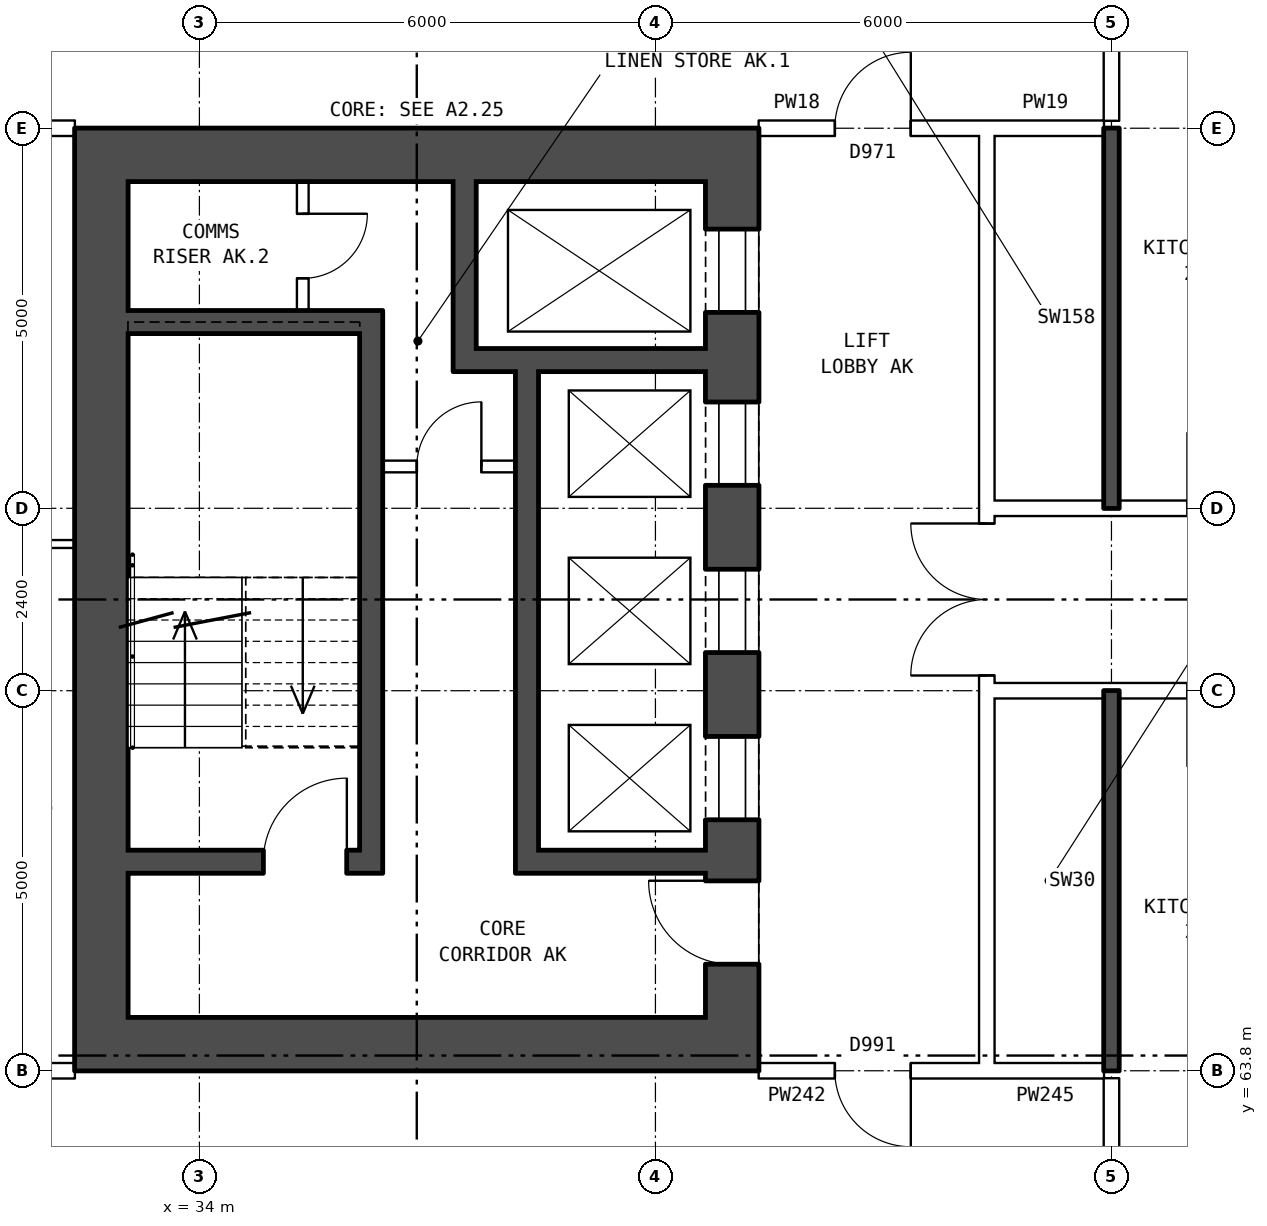
"""IFC4 building model, lengths in metres.
Left out: names, types, materials, properties, quantities, classifications, styles, units other than length and angle.
Written with IfcOpenShell. Run it as: python <this file> out.ifc"""

import sys

from ifc_helpers import new_model, si_unit, direction, frame, frame_2d, origin, place, context, subcontext, project, spatial, rectangle, extrude, element, fill, save


model = new_model("IFC4")
c1 = context("Model", 3, precision=1e-05, world=origin(), true_north=direction((0.0, 1.0)))
c2 = subcontext(c1, "Body", "Model", "MODEL_VIEW")
j1 = project(units=[si_unit("LENGTHUNIT", "METRE"), si_unit("PLANEANGLEUNIT", "RADIAN")], contexts=[c1])
p1 = place(None, origin())
s1 = spatial("IfcSite", under=j1, at=p1, CompositionType="ELEMENT")
p2 = place(p1, origin())
s2 = spatial("IfcBuilding", under=s1, at=p2, CompositionType="ELEMENT")
p3 = place(p2, frame((0.0, 0.0, 87.1)))
s3 = spatial("IfcBuildingStorey", under=s2, at=p3, CompositionType="ELEMENT", Elevation=87.1)
p4 = place(p3, frame((41.01, 75.5, 0.0), z_axis=(0.0, 0.0, 1.0), x_axis=(0.0, -1.0, 0.0)))
e1 = element("IfcWall", 1, at=p4, inside=s3, PredefinedType="SHEAR", context=c2, shape_type="SweptSolid", body=[
    extrude(rectangle(XDim=11.0, YDim=0.7, at=frame_2d((5.5, 0.0))), origin(), (0.0, 0.0, 1.0), 2.85),
])
p5 = place(p4, frame((0.625, 0.0, 0.0)))
e2 = element("IfcOpeningElement", 2, at=p5, cuts=e1, PredefinedType="OPENING", context=c2, shape_type="SweptSolid", body=[
    extrude(rectangle(XDim=1.1, YDim=2.1, at=frame_2d((0.55, 1.05))), frame((0.0, 0.36, 0.0), z_axis=(0.0, -1.0, 0.0), x_axis=(1.0, 0.0, 0.0)), (0.0, 0.0, 1.0), 0.72),
])
p6 = place(p4, frame((2.9, 0.0, 0.0)))
e3 = element("IfcOpeningElement", 3, at=p6, cuts=e1, PredefinedType="OPENING", context=c2, shape_type="SweptSolid", body=[
    extrude(rectangle(XDim=1.1, YDim=2.1, at=frame_2d((0.55, 1.05))), frame((0.0, 0.36, 0.0), z_axis=(0.0, -1.0, 0.0), x_axis=(1.0, 0.0, 0.0)), (0.0, 0.0, 1.0), 0.72),
])
p7 = place(p4, frame((5.1, 0.0, 0.0)))
e4 = element("IfcOpeningElement", 4, at=p7, cuts=e1, PredefinedType="OPENING", context=c2, shape_type="SweptSolid", body=[
    extrude(rectangle(XDim=1.1, YDim=2.1, at=frame_2d((0.55, 1.05))), frame((0.0, 0.36, 0.0), z_axis=(0.0, -1.0, 0.0), x_axis=(1.0, 0.0, 0.0)), (0.0, 0.0, 1.0), 0.72),
])
p8 = place(p4, frame((7.3, 0.0, 0.0)))
e5 = element("IfcOpeningElement", 5, at=p8, cuts=e1, PredefinedType="OPENING", context=c2, shape_type="SweptSolid", body=[
    extrude(rectangle(XDim=1.1, YDim=2.1, at=frame_2d((0.55, 1.05))), frame((0.0, 0.36, 0.0), z_axis=(0.0, -1.0, 0.0), x_axis=(1.0, 0.0, 0.0)), (0.0, 0.0, 1.0), 0.72),
])
p9 = place(p4, frame((9.2, 0.0, 0.0)))
e6 = element("IfcOpeningElement", 6, at=p9, cuts=e1, PredefinedType="OPENING", context=c2, shape_type="SweptSolid", body=[
    extrude(rectangle(XDim=1.1, YDim=2.1, at=frame_2d((0.55, 1.05))), frame((0.0, 0.36, 0.0), z_axis=(0.0, -1.0, 0.0), x_axis=(1.0, 0.0, 0.0)), (0.0, 0.0, 1.0), 0.72),
])
p10 = place(p3, frame((32.71, 75.5, 0.0), z_axis=(0.0, 0.0, 1.0), x_axis=(0.0, -1.0, 0.0)))
e7 = element("IfcWall", 7, at=p10, inside=s3, PredefinedType="SHEAR", context=c2, shape_type="SweptSolid", body=[
    extrude(rectangle(XDim=11.0, YDim=0.7, at=frame_2d((5.5, 0.0))), origin(), (0.0, 0.0, 1.0), 2.85),
])
for number, where, z_axis, x_axis in (
    (8, (41.36, 75.85, 0.0), (0.0, 0.0, 1.0), (-1.0, 0.0, 0.0)),
    (9, (41.36, 64.15, 0.0), (0.0, 0.0, 1.0), (-1.0, 0.0, 0.0)),
):
    element("IfcWall", number, at=place(p3, frame(where, z_axis=z_axis, x_axis=x_axis)), inside=s3, PredefinedType="SHEAR", context=c2, shape_type="SweptSolid", body=[
        extrude(rectangle(XDim=9.0, YDim=0.7, at=frame_2d((4.5, 0.0))), origin(), (0.0, 0.0, 1.0), 2.85),
    ])
p11 = place(p3, frame((36.11, 73.65, 0.0), z_axis=(0.0, 0.0, 1.0), x_axis=(-1.0, 0.0, 0.0)))
e10 = element("IfcWall", 10, at=p11, inside=s3, PredefinedType="SHEAR", context=c2, shape_type="SweptSolid", body=[
    extrude(rectangle(XDim=3.05, YDim=0.3, at=frame_2d((1.525, 0.0))), origin(), (0.0, 0.0, 1.0), 2.85),
])
p12 = place(p3, frame((40.66, 73.15, 0.0), z_axis=(0.0, 0.0, 1.0), x_axis=(-1.0, 0.0, 0.0)))
e11 = element("IfcWall", 11, at=p12, inside=s3, PredefinedType="SHEAR", context=c2, shape_type="SweptSolid", body=[
    extrude(rectangle(XDim=3.32, YDim=0.3, at=frame_2d((1.66, 0.0))), origin(), (0.0, 0.0, 1.0), 2.85),
])
p13 = place(p3, frame((38.16, 71.75, 0.0), z_axis=(0.0, 0.0, 1.0), x_axis=(-1.0, 0.0, 0.0)))
e12 = element("IfcWall", 12, at=p13, inside=s3, PredefinedType="PARTITIONING", context=c2, shape_type="SweptSolid", body=[
    extrude(rectangle(XDim=1.75, YDim=0.15, at=frame_2d((0.875, 0.0))), origin(), (0.0, 0.0, 1.0), 2.85),
])
p14 = place(p13, frame((0.45, 0.0, 0.0)))
e13 = element("IfcOpeningElement", 13, at=p14, cuts=e12, PredefinedType="OPENING", context=c2, shape_type="SweptSolid", body=[
    extrude(rectangle(XDim=0.85, YDim=2.1, at=frame_2d((0.425, 1.05))), frame((0.0, 0.085, 0.0), z_axis=(0.0, -1.0, 0.0), x_axis=(1.0, 0.0, 0.0)), (0.0, 0.0, 1.0), 0.17),
])
p15 = place(p3, frame((40.66, 66.55, 0.0), z_axis=(0.0, 0.0, 1.0), x_axis=(-1.0, 0.0, 0.0)))
e14 = element("IfcWall", 14, at=p15, inside=s3, PredefinedType="SHEAR", context=c2, shape_type="SweptSolid", body=[
    extrude(rectangle(XDim=2.2, YDim=0.3, at=frame_2d((1.1, 0.0))), origin(), (0.0, 0.0, 1.0), 2.85),
])
p16 = place(p3, frame((36.11, 66.55, 0.0), z_axis=(0.0, 0.0, 1.0), x_axis=(-1.0, 0.0, 0.0)))
e15 = element("IfcWall", 15, at=p16, inside=s3, PredefinedType="SHEAR", context=c2, shape_type="SweptSolid", body=[
    extrude(rectangle(XDim=3.05, YDim=0.3, at=frame_2d((1.525, 0.0))), origin(), (0.0, 0.0, 1.0), 2.85),
])
p17 = place(p16, frame((0.17, 0.0, 0.0)))
e16 = element("IfcOpeningElement", 16, at=p17, cuts=e15, PredefinedType="OPENING", context=c2, shape_type="SweptSolid", body=[
    extrude(rectangle(XDim=1.1, YDim=2.1, at=frame_2d((0.55, 1.05))), frame((0.0, 0.16, 0.0), z_axis=(0.0, -1.0, 0.0), x_axis=(1.0, 0.0, 0.0)), (0.0, 0.0, 1.0), 0.32),
])
p18 = place(p3, frame((38.31, 73.0, 0.0), z_axis=(0.0, 0.0, 1.0), x_axis=(0.0, -1.0, 0.0)))
e17 = element("IfcWall", 17, at=p18, inside=s3, PredefinedType="SHEAR", context=c2, shape_type="SweptSolid", body=[
    extrude(rectangle(XDim=6.6, YDim=0.3, at=frame_2d((3.3, 0.0))), origin(), (0.0, 0.0, 1.0), 2.85),
])
p19 = place(p3, frame((37.49, 75.5, 0.0), z_axis=(0.0, 0.0, 1.0), x_axis=(0.0, -1.0, 0.0)))
e18 = element("IfcWall", 18, at=p19, inside=s3, PredefinedType="SHEAR", context=c2, shape_type="SweptSolid", body=[
    extrude(rectangle(XDim=2.2, YDim=0.3, at=frame_2d((1.1, 0.0))), origin(), (0.0, 0.0, 1.0), 2.85),
])
p20 = place(p3, frame((36.26, 73.8, 0.0), z_axis=(0.0, 0.0, 1.0), x_axis=(0.0, -1.0, 0.0)))
e19 = element("IfcWall", 19, at=p20, inside=s3, PredefinedType="SHEAR", context=c2, shape_type="SweptSolid", body=[
    extrude(rectangle(XDim=7.4, YDim=0.3, at=frame_2d((3.7, 0.0))), origin(), (0.0, 0.0, 1.0), 2.85),
])
p21 = place(p3, frame((35.36, 75.5, 0.0), z_axis=(0.0, 0.0, 1.0), x_axis=(0.0, -1.0, 0.0)))
e20 = element("IfcWall", 20, at=p21, inside=s3, PredefinedType="PARTITIONING", context=c2, shape_type="SweptSolid", body=[
    extrude(rectangle(XDim=1.7, YDim=0.15, at=frame_2d((0.85, 0.0))), origin(), (0.0, 0.0, 1.0), 2.85),
])
p22 = place(p21, frame((0.425, 0.0, 0.0)))
e21 = element("IfcOpeningElement", 21, at=p22, cuts=e20, PredefinedType="OPENING", context=c2, shape_type="SweptSolid", body=[
    extrude(rectangle(XDim=0.85, YDim=2.1, at=frame_2d((0.425, 1.05))), frame((0.0, 0.085, 0.0), z_axis=(0.0, -1.0, 0.0), x_axis=(1.0, 0.0, 0.0)), (0.0, 0.0, 1.0), 0.17),
])
p23 = place(p3, frame((44.36, 63.9, 0.0), z_axis=(0.0, 0.0, 1.0), x_axis=(0.0, 1.0, 0.0)))
e22 = element("IfcWall", 22, at=p23, inside=s3, PredefinedType="PARTITIONING", context=c2, shape_type="SweptSolid", body=[
    extrude(rectangle(XDim=12.2, YDim=0.2, at=frame_2d((6.1, 0.0))), origin(), (0.0, 0.0, 1.0), 2.85),
])
p24 = place(p23, frame((5.1, 0.0, 0.0)))
e23 = element("IfcOpeningElement", 23, at=p24, cuts=e22, PredefinedType="OPENING", context=c2, shape_type="SweptSolid", body=[
    extrude(rectangle(XDim=2.0, YDim=2.1, at=frame_2d((1.0, 1.05))), frame((0.0, 0.11, 0.0), z_axis=(0.0, -1.0, 0.0), x_axis=(1.0, 0.0, 0.0)), (0.0, 0.0, 1.0), 0.22),
])
p25 = place(p3, frame((26.01, 63.8, 0.0), z_axis=(0.0, 0.0, 1.0), x_axis=(1.0, 0.0, 0.0)))
e24 = element("IfcWall", 24, at=p25, inside=s3, PredefinedType="PARTITIONING", context=c2, shape_type="SweptSolid", body=[
    extrude(rectangle(XDim=6.35, YDim=0.2, at=frame_2d((3.175, 0.0))), origin(), (0.0, 0.0, 1.0), 2.85),
])
p26 = place(p25, frame((3.77, 0.0, 0.0)))
e25 = element("IfcOpeningElement", 25, at=p26, cuts=e24, PredefinedType="OPENING", context=c2, shape_type="SweptSolid", body=[
    extrude(rectangle(XDim=0.8, YDim=2.1, at=frame_2d((0.4, 1.05))), frame((0.0, 0.11, 0.0), z_axis=(0.0, -1.0, 0.0), x_axis=(1.0, 0.0, 0.0)), (0.0, 0.0, 1.0), 0.22),
])
p27 = place(p3, frame((41.36, 63.8, 0.0), z_axis=(0.0, 0.0, 1.0), x_axis=(1.0, 0.0, 0.0)))
e26 = element("IfcWall", 26, at=p27, inside=s3, PredefinedType="PARTITIONING", context=c2, shape_type="SweptSolid", body=[
    extrude(rectangle(XDim=3.0, YDim=0.2, at=frame_2d((1.5, 0.0))), origin(), (0.0, 0.0, 1.0), 2.85),
])
p28 = place(p27, frame((1.0, 0.0, 0.0)))
e27 = element("IfcOpeningElement", 27, at=p28, cuts=e26, PredefinedType="OPENING", context=c2, shape_type="SweptSolid", body=[
    extrude(rectangle(XDim=1.0, YDim=2.1, at=frame_2d((0.5, 1.05))), frame((0.0, 0.11, 0.0), z_axis=(0.0, -1.0, 0.0), x_axis=(1.0, 0.0, 0.0)), (0.0, 0.0, 1.0), 0.22),
])
p29 = place(p3, frame((44.36, 63.8, 0.0), z_axis=(0.0, 0.0, 1.0), x_axis=(1.0, 0.0, 0.0)))
e28 = element("IfcWall", 28, at=p29, inside=s3, PredefinedType="PARTITIONING", context=c2, shape_type="SweptSolid", body=[
    extrude(rectangle(XDim=1.54, YDim=0.2, at=frame_2d((0.77, 0.0))), origin(), (0.0, 0.0, 1.0), 2.85),
])
p30 = place(p3, frame((44.36, 68.8, 0.0), z_axis=(0.0, 0.0, 1.0), x_axis=(1.0, 0.0, 0.0)))
e29 = element("IfcWall", 29, at=p30, inside=s3, PredefinedType="PARTITIONING", context=c2, shape_type="SweptSolid", body=[
    extrude(rectangle(XDim=19.28, YDim=0.2, at=frame_2d((9.64, 0.0))), origin(), (0.0, 0.0, 1.0), 2.85),
])
p31 = place(p30, frame((14.64, 0.0, 0.0)))
e30 = element("IfcOpeningElement", 30, at=p31, cuts=e29, PredefinedType="OPENING", context=c2, shape_type="SweptSolid", body=[
    extrude(rectangle(XDim=1.0, YDim=2.1, at=frame_2d((0.5, 1.05))), frame((0.0, 0.11, 0.0), z_axis=(0.0, -1.0, 0.0), x_axis=(1.0, 0.0, 0.0)), (0.0, 0.0, 1.0), 0.22),
])
p32 = place(p30, frame((11.64, 0.0, 0.0)))
e31 = element("IfcOpeningElement", 31, at=p32, cuts=e29, PredefinedType="OPENING", context=c2, shape_type="SweptSolid", body=[
    extrude(rectangle(XDim=1.0, YDim=2.1, at=frame_2d((0.5, 1.05))), frame((0.0, 0.11, 0.0), z_axis=(0.0, -1.0, 0.0), x_axis=(1.0, 0.0, 0.0)), (0.0, 0.0, 1.0), 0.22),
])
p33 = place(p30, frame((2.64, 0.0, 0.0)))
e32 = element("IfcOpeningElement", 32, at=p33, cuts=e29, PredefinedType="OPENING", context=c2, shape_type="SweptSolid", body=[
    extrude(rectangle(XDim=1.0, YDim=2.1, at=frame_2d((0.5, 1.05))), frame((0.0, 0.11, 0.0), z_axis=(0.0, -1.0, 0.0), x_axis=(1.0, 0.0, 0.0)), (0.0, 0.0, 1.0), 0.22),
])
p34 = place(p3, frame((28.1, 70.73, 0.0), z_axis=(0.0, 0.0, 1.0), x_axis=(1.0, 0.0, 0.0)))
e33 = element("IfcWall", 33, at=p34, inside=s3, PredefinedType="PARTITIONING", context=c2, shape_type="SweptSolid", body=[
    extrude(rectangle(XDim=4.26, YDim=0.1, at=frame_2d((2.13, 0.0))), origin(), (0.0, 0.0, 1.0), 2.85),
])
p35 = place(p3, frame((44.36, 71.2, 0.0), z_axis=(0.0, 0.0, 1.0), x_axis=(1.0, 0.0, 0.0)))
e34 = element("IfcWall", 34, at=p35, inside=s3, PredefinedType="PARTITIONING", context=c2, shape_type="SweptSolid", body=[
    extrude(rectangle(XDim=19.28, YDim=0.2, at=frame_2d((9.64, 0.0))), origin(), (0.0, 0.0, 1.0), 2.85),
])
p36 = place(p35, frame((14.64, 0.0, 0.0)))
e35 = element("IfcOpeningElement", 35, at=p36, cuts=e34, PredefinedType="OPENING", context=c2, shape_type="SweptSolid", body=[
    extrude(rectangle(XDim=1.0, YDim=2.1, at=frame_2d((0.5, 1.05))), frame((0.0, 0.11, 0.0), z_axis=(0.0, -1.0, 0.0), x_axis=(1.0, 0.0, 0.0)), (0.0, 0.0, 1.0), 0.22),
])
p37 = place(p35, frame((8.64, 0.0, 0.0)))
e36 = element("IfcOpeningElement", 36, at=p37, cuts=e34, PredefinedType="OPENING", context=c2, shape_type="SweptSolid", body=[
    extrude(rectangle(XDim=1.0, YDim=2.1, at=frame_2d((0.5, 1.05))), frame((0.0, 0.11, 0.0), z_axis=(0.0, -1.0, 0.0), x_axis=(1.0, 0.0, 0.0)), (0.0, 0.0, 1.0), 0.22),
])
p38 = place(p35, frame((2.64, 0.0, 0.0)))
e37 = element("IfcOpeningElement", 37, at=p38, cuts=e34, PredefinedType="OPENING", context=c2, shape_type="SweptSolid", body=[
    extrude(rectangle(XDim=1.0, YDim=2.1, at=frame_2d((0.5, 1.05))), frame((0.0, 0.11, 0.0), z_axis=(0.0, -1.0, 0.0), x_axis=(1.0, 0.0, 0.0)), (0.0, 0.0, 1.0), 0.22),
])
p39 = place(p3, frame((26.01, 76.2, 0.0), z_axis=(0.0, 0.0, 1.0), x_axis=(1.0, 0.0, 0.0)))
e38 = element("IfcWall", 38, at=p39, inside=s3, PredefinedType="PARTITIONING", context=c2, shape_type="SweptSolid", body=[
    extrude(rectangle(XDim=6.35, YDim=0.2, at=frame_2d((3.175, 0.0))), origin(), (0.0, 0.0, 1.0), 2.85),
])
p40 = place(p39, frame((3.77, 0.0, 0.0)))
e39 = element("IfcOpeningElement", 39, at=p40, cuts=e38, PredefinedType="OPENING", context=c2, shape_type="SweptSolid", body=[
    extrude(rectangle(XDim=0.8, YDim=2.1, at=frame_2d((0.4, 1.05))), frame((0.0, 0.11, 0.0), z_axis=(0.0, -1.0, 0.0), x_axis=(1.0, 0.0, 0.0)), (0.0, 0.0, 1.0), 0.22),
])
p41 = place(p3, frame((41.36, 76.2, 0.0), z_axis=(0.0, 0.0, 1.0), x_axis=(1.0, 0.0, 0.0)))
e40 = element("IfcWall", 40, at=p41, inside=s3, PredefinedType="PARTITIONING", context=c2, shape_type="SweptSolid", body=[
    extrude(rectangle(XDim=3.0, YDim=0.2, at=frame_2d((1.5, 0.0))), origin(), (0.0, 0.0, 1.0), 2.85),
])
p42 = place(p41, frame((1.0, 0.0, 0.0)))
e41 = element("IfcOpeningElement", 41, at=p42, cuts=e40, PredefinedType="OPENING", context=c2, shape_type="SweptSolid", body=[
    extrude(rectangle(XDim=1.0, YDim=2.1, at=frame_2d((0.5, 1.05))), frame((0.0, 0.11, 0.0), z_axis=(0.0, -1.0, 0.0), x_axis=(1.0, 0.0, 0.0)), (0.0, 0.0, 1.0), 0.22),
])
p43 = place(p3, frame((44.36, 76.2, 0.0), z_axis=(0.0, 0.0, 1.0), x_axis=(1.0, 0.0, 0.0)))
e42 = element("IfcWall", 42, at=p43, inside=s3, PredefinedType="PARTITIONING", context=c2, shape_type="SweptSolid", body=[
    extrude(rectangle(XDim=1.54, YDim=0.2, at=frame_2d((0.77, 0.0))), origin(), (0.0, 0.0, 1.0), 2.85),
])
p44 = place(p3, frame((46.0, 61.5, 0.0), z_axis=(0.0, 0.0, 1.0), x_axis=(0.0, 1.0, 0.0)))
e43 = element("IfcWall", 43, at=p44, inside=s3, PredefinedType="PARTITIONING", context=c2, shape_type="SweptSolid", body=[
    extrude(rectangle(XDim=2.2, YDim=0.2, at=frame_2d((1.1, 0.0))), origin(), (0.0, 0.0, 1.0), 2.85),
])
for number, where, z_axis, x_axis in (
    (44, (46.0, 63.8, 0.0), (0.0, 0.0, 1.0), (0.0, 1.0, 0.0)),
    (45, (46.0, 71.2, 0.0), (0.0, 0.0, 1.0), (0.0, 1.0, 0.0)),
):
    element("IfcWall", number, at=place(p3, frame(where, z_axis=z_axis, x_axis=x_axis)), inside=s3, PredefinedType="SOLIDWALL", context=c2, shape_type="SweptSolid", body=[
        extrude(rectangle(XDim=5.0, YDim=0.2, at=frame_2d((2.5, 0.0))), origin(), (0.0, 0.0, 1.0), 2.85),
    ])
p45 = place(p3, frame((46.0, 76.3, 0.0), z_axis=(0.0, 0.0, 1.0), x_axis=(0.0, 1.0, 0.0)))
e46 = element("IfcWall", 46, at=p45, inside=s3, PredefinedType="PARTITIONING", context=c2, shape_type="SweptSolid", body=[
    extrude(rectangle(XDim=2.2, YDim=0.2, at=frame_2d((1.1, 0.0))), origin(), (0.0, 0.0, 1.0), 2.85),
])
p46 = place(p5, origin())
e47 = element("IfcDoor", 47, at=p46, inside=s3, OperationType="DOUBLE_DOOR_SLIDING", PredefinedType="DOOR", context=c2, shape_type="SweptSolid", body=[
    extrude(rectangle(XDim=1.1, YDim=2.1, at=frame_2d((0.55, 1.05))), frame((0.0, -0.285, 0.0), z_axis=(0.0, -1.0, 0.0), x_axis=(1.0, 0.0, 0.0)), (0.0, 0.0, 1.0), 0.05),
])
fill(e2, e47)
p47 = place(p6, origin())
e48 = element("IfcDoor", 48, at=p47, inside=s3, OperationType="DOUBLE_DOOR_SLIDING", PredefinedType="DOOR", context=c2, shape_type="SweptSolid", body=[
    extrude(rectangle(XDim=1.1, YDim=2.1, at=frame_2d((0.55, 1.05))), frame((0.0, -0.285, 0.0), z_axis=(0.0, -1.0, 0.0), x_axis=(1.0, 0.0, 0.0)), (0.0, 0.0, 1.0), 0.05),
])
fill(e3, e48)
p48 = place(p7, origin())
e49 = element("IfcDoor", 49, at=p48, inside=s3, OperationType="DOUBLE_DOOR_SLIDING", PredefinedType="DOOR", context=c2, shape_type="SweptSolid", body=[
    extrude(rectangle(XDim=1.1, YDim=2.1, at=frame_2d((0.55, 1.05))), frame((0.0, -0.285, 0.0), z_axis=(0.0, -1.0, 0.0), x_axis=(1.0, 0.0, 0.0)), (0.0, 0.0, 1.0), 0.05),
])
fill(e4, e49)
p49 = place(p8, origin())
e50 = element("IfcDoor", 50, at=p49, inside=s3, OperationType="DOUBLE_DOOR_SLIDING", PredefinedType="DOOR", context=c2, shape_type="SweptSolid", body=[
    extrude(rectangle(XDim=1.1, YDim=2.1, at=frame_2d((0.55, 1.05))), frame((0.0, -0.285, 0.0), z_axis=(0.0, -1.0, 0.0), x_axis=(1.0, 0.0, 0.0)), (0.0, 0.0, 1.0), 0.05),
])
fill(e5, e50)
p50 = place(p9, frame((1.1, 0.0, 0.0), z_axis=(0.0, 0.0, 1.0), x_axis=(-1.0, 0.0, 0.0)))
e51 = element("IfcDoor", 51, at=p50, inside=s3, OperationType="SINGLE_SWING_RIGHT", PredefinedType="DOOR", context=c2, shape_type="SweptSolid", body=[
    extrude(rectangle(XDim=1.1, YDim=2.1, at=frame_2d((0.55, 1.05))), frame((0.0, 0.335, 0.0), z_axis=(0.0, -1.0, 0.0), x_axis=(1.0, 0.0, 0.0)), (0.0, 0.0, 1.0), 0.05),
])
fill(e6, e51)
p51 = place(p17, frame((1.1, 0.0, 0.0), z_axis=(0.0, 0.0, 1.0), x_axis=(-1.0, 0.0, 0.0)))
e52 = element("IfcDoor", 52, at=p51, inside=s3, OperationType="SINGLE_SWING_RIGHT", PredefinedType="DOOR", context=c2, shape_type="SweptSolid", body=[
    extrude(rectangle(XDim=1.1, YDim=2.1, at=frame_2d((0.55, 1.05))), frame((0.0, 0.025, 0.0), z_axis=(0.0, -1.0, 0.0), x_axis=(1.0, 0.0, 0.0)), (0.0, 0.0, 1.0), 0.05),
])
fill(e16, e52)
p52 = place(p14, frame((0.85, 0.0, 0.0), z_axis=(0.0, 0.0, 1.0), x_axis=(-1.0, 0.0, 0.0)))
e53 = element("IfcDoor", 53, at=p52, inside=s3, OperationType="SINGLE_SWING_RIGHT", PredefinedType="DOOR", context=c2, shape_type="SweptSolid", body=[
    extrude(rectangle(XDim=0.85, YDim=2.1, at=frame_2d((0.425, 1.05))), frame((0.0, 0.025, 0.0), z_axis=(0.0, -1.0, 0.0), x_axis=(1.0, 0.0, 0.0)), (0.0, 0.0, 1.0), 0.05),
])
fill(e13, e53)
p53 = place(p22, origin())
e54 = element("IfcDoor", 54, at=p53, inside=s3, OperationType="SINGLE_SWING_LEFT", PredefinedType="DOOR", context=c2, shape_type="SweptSolid", body=[
    extrude(rectangle(XDim=0.85, YDim=2.1, at=frame_2d((0.425, 1.05))), frame((0.0, 0.025, 0.0), z_axis=(0.0, -1.0, 0.0), x_axis=(1.0, 0.0, 0.0)), (0.0, 0.0, 1.0), 0.05),
])
fill(e21, e54)
p54 = place(p24, origin())
e55 = element("IfcDoor", 55, at=p54, inside=s3, OperationType="DOUBLE_DOOR_SINGLE_SWING", PredefinedType="DOOR", context=c2, shape_type="SweptSolid", body=[
    extrude(rectangle(XDim=2.0, YDim=2.1, at=frame_2d((1.0, 1.05))), frame((0.0, 0.025, 0.0), z_axis=(0.0, -1.0, 0.0), x_axis=(1.0, 0.0, 0.0)), (0.0, 0.0, 1.0), 0.05),
])
fill(e23, e55)
p55 = place(p28, frame((1.0, 0.0, 0.0), z_axis=(0.0, 0.0, 1.0), x_axis=(-1.0, 0.0, 0.0)))
e56 = element("IfcDoor", 56, at=p55, inside=s3, OperationType="SINGLE_SWING_LEFT", PredefinedType="DOOR", context=c2, shape_type="SweptSolid", body=[
    extrude(rectangle(XDim=1.0, YDim=2.1, at=frame_2d((0.5, 1.05))), frame((0.0, 0.025, 0.0), z_axis=(0.0, -1.0, 0.0), x_axis=(1.0, 0.0, 0.0)), (0.0, 0.0, 1.0), 0.05),
])
fill(e27, e56)
p56 = place(p42, origin())
e57 = element("IfcDoor", 57, at=p56, inside=s3, OperationType="SINGLE_SWING_RIGHT", PredefinedType="DOOR", context=c2, shape_type="SweptSolid", body=[
    extrude(rectangle(XDim=1.0, YDim=2.1, at=frame_2d((0.5, 1.05))), frame((0.0, 0.025, 0.0), z_axis=(0.0, -1.0, 0.0), x_axis=(1.0, 0.0, 0.0)), (0.0, 0.0, 1.0), 0.05),
])
fill(e41, e57)
save(model, sys.argv[1])
